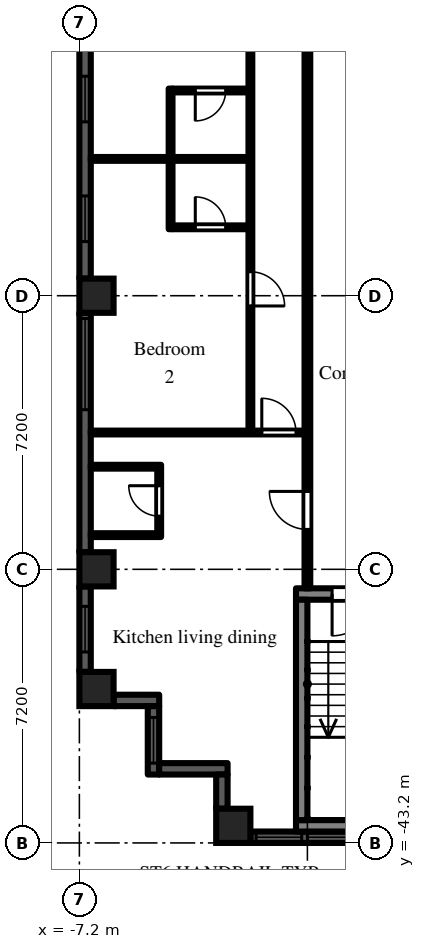
"""IFC4 building model, lengths in metres.
Left out: names, types, materials, properties, quantities, classifications, styles, units other than length and angle.
Written with IfcOpenShell. Run it as: python <this file> out.ifc"""

import sys

from ifc_helpers import new_model, si_unit, direction, frame, frame_2d, origin, origin_2d, place, context, subcontext, project, spatial, rectangle, extrude, element, fill, save


model = new_model("IFC4")
c1 = context("Model", 3, precision=1e-05, world=origin(), true_north=direction((0.0, 1.0)))
c2 = subcontext(c1, "Body", "Model", "MODEL_VIEW")
j1 = project(units=[si_unit("LENGTHUNIT", "METRE"), si_unit("PLANEANGLEUNIT", "RADIAN")], contexts=[c1])
p1 = place(None, origin())
s1 = spatial("IfcSite", under=j1, at=p1, CompositionType="ELEMENT")
p2 = place(p1, origin())
s2 = spatial("IfcBuilding", under=s1, at=p2, CompositionType="ELEMENT")
p3 = place(p2, frame((0.0, 0.0, 75.9)))
s3 = spatial("IfcBuildingStorey", under=s2, at=p3, CompositionType="ELEMENT", Elevation=75.9)
for number, where, z_axis, x_axis in (
    (1, (-6.75, -39.15, 0.0), (0.0, 0.0, 1.0), (1.0, 0.0, 0.0)),
    (2, (-6.75, -36.0, 0.0), (0.0, 0.0, 1.0), (1.0, 0.0, 0.0)),
    (3, (-6.75, -28.8, 0.0), (0.0, 0.0, 1.0), (1.0, 0.0, 0.0)),
    (4, (-3.15, -42.75, 0.0), (0.0, 0.0, 1.0), (1.0, 0.0, 0.0)),
):
    element("IfcColumn", number, at=place(p3, frame(where, z_axis=z_axis, x_axis=x_axis)), inside=s3, PredefinedType="COLUMN", context=c2, shape_type="SweptSolid", body=[
        extrude(rectangle(XDim=0.9, YDim=0.9, at=origin_2d()), origin(), (0.0, 0.0, 1.0), 3.0),
    ])
p4 = place(p3, frame((-7.05, -22.05, 0.0), z_axis=(0.0, 0.0, 1.0), x_axis=(0.0, -1.0, 0.0)))
e5 = element("IfcWall", 5, at=p4, inside=s3, PredefinedType="SOLIDWALL", context=c2, shape_type="SweptSolid", body=[
    extrude(rectangle(XDim=6.3, YDim=0.3, at=frame_2d((3.15, 0.0))), origin(), (0.0, 0.0, 1.0), 2.1),
])
p5 = place(p4, frame((0.975, 0.0, 0.2)))
e6 = element("IfcOpeningElement", 6, at=p5, cuts=e5, PredefinedType="OPENING", context=c2, shape_type="SweptSolid", body=[
    extrude(rectangle(XDim=1.2, YDim=1.85, at=frame_2d((0.6, 0.925))), frame((0.0, 0.16, 0.0), z_axis=(0.0, -1.0, 0.0), x_axis=(1.0, 0.0, 0.0)), (0.0, 0.0, 1.0), 0.32),
])
p6 = place(p4, frame((4.125, 0.0, 0.2)))
e7 = element("IfcOpeningElement", 7, at=p6, cuts=e5, PredefinedType="OPENING", context=c2, shape_type="SweptSolid", body=[
    extrude(rectangle(XDim=1.2, YDim=1.85, at=frame_2d((0.6, 0.925))), frame((0.0, 0.16, 0.0), z_axis=(0.0, -1.0, 0.0), x_axis=(1.0, 0.0, 0.0)), (0.0, 0.0, 1.0), 0.32),
])
p7 = place(p3, frame((-7.05, -29.25, 0.0), z_axis=(0.0, 0.0, 1.0), x_axis=(0.0, -1.0, 0.0)))
e8 = element("IfcWall", 8, at=p7, inside=s3, PredefinedType="SOLIDWALL", context=c2, shape_type="SweptSolid", body=[
    extrude(rectangle(XDim=6.3, YDim=0.3, at=frame_2d((3.15, 0.0))), origin(), (0.0, 0.0, 1.0), 2.1),
])
p8 = place(p7, frame((0.15, 0.0, 0.2)))
e9 = element("IfcOpeningElement", 9, at=p8, cuts=e8, PredefinedType="OPENING", context=c2, shape_type="SweptSolid", body=[
    extrude(rectangle(XDim=2.4, YDim=1.85, at=frame_2d((1.2, 0.925))), frame((0.0, 0.16, 0.0), z_axis=(0.0, -1.0, 0.0), x_axis=(1.0, 0.0, 0.0)), (0.0, 0.0, 1.0), 0.32),
])
p9 = place(p3, frame((-7.05, -36.45, 0.0), z_axis=(0.0, 0.0, 1.0), x_axis=(0.0, -1.0, 0.0)))
e10 = element("IfcWall", 10, at=p9, inside=s3, PredefinedType="SOLIDWALL", context=c2, shape_type="SweptSolid", body=[
    extrude(rectangle(XDim=2.25, YDim=0.3, at=frame_2d((1.125, 0.0))), origin(), (0.0, 0.0, 1.0), 2.1),
])
p10 = place(p9, frame((0.525, 0.0, 0.2)))
e11 = element("IfcOpeningElement", 11, at=p10, cuts=e10, PredefinedType="OPENING", context=c2, shape_type="SweptSolid", body=[
    extrude(rectangle(XDim=1.2, YDim=1.85, at=frame_2d((0.6, 0.925))), frame((0.0, 0.16, 0.0), z_axis=(0.0, -1.0, 0.0), x_axis=(1.0, 0.0, 0.0)), (0.0, 0.0, 1.0), 0.32),
])
p11 = place(p3, frame((-6.3, -39.45, 0.0), z_axis=(0.0, 0.0, 1.0), x_axis=(1.0, 0.0, 0.0)))
e12 = element("IfcWall", 12, at=p11, inside=s3, PredefinedType="SOLIDWALL", context=c2, shape_type="SweptSolid", body=[
    extrude(rectangle(XDim=1.2, YDim=0.3, at=frame_2d((0.6, 0.0))), origin(), (0.0, 0.0, 1.0), 2.575),
])
p12 = place(p3, frame((-5.25, -39.6, 0.0), z_axis=(0.0, 0.0, 1.0), x_axis=(0.0, -1.0, 0.0)))
e13 = element("IfcWall", 13, at=p12, inside=s3, PredefinedType="SOLIDWALL", context=c2, shape_type="SweptSolid", body=[
    extrude(rectangle(XDim=1.8, YDim=0.3, at=frame_2d((0.9, 0.0))), origin(), (0.0, 0.0, 1.0), 2.575),
])
p13 = place(p12, frame((0.3, 0.0, 0.2)))
e14 = element("IfcOpeningElement", 14, at=p13, cuts=e13, PredefinedType="OPENING", context=c2, shape_type="SweptSolid", body=[
    extrude(rectangle(XDim=1.2, YDim=1.85, at=frame_2d((0.6, 0.925))), frame((0.0, 0.16, 0.0), z_axis=(0.0, -1.0, 0.0), x_axis=(1.0, 0.0, 0.0)), (0.0, 0.0, 1.0), 0.32),
])
p14 = place(p3, frame((-5.1, -41.25, 0.0), z_axis=(0.0, 0.0, 1.0), x_axis=(1.0, 0.0, 0.0)))
e15 = element("IfcWall", 15, at=p14, inside=s3, PredefinedType="SOLIDWALL", context=c2, shape_type="SweptSolid", body=[
    extrude(rectangle(XDim=1.8, YDim=0.3, at=frame_2d((0.9, 0.0))), origin(), (0.0, 0.0, 1.0), 2.575),
])
p15 = place(p3, frame((-3.45, -41.4, 0.0), z_axis=(0.0, 0.0, 1.0), x_axis=(0.0, -1.0, 0.0)))
e16 = element("IfcWall", 16, at=p15, inside=s3, PredefinedType="SOLIDWALL", context=c2, shape_type="SweptSolid", body=[
    extrude(rectangle(XDim=0.9, YDim=0.3, at=frame_2d((0.45, 0.0))), origin(), (0.0, 0.0, 1.0), 2.575),
])
p16 = place(p3, frame((-2.7, -43.05, 0.0), z_axis=(0.0, 0.0, 1.0), x_axis=(1.0, 0.0, 0.0)))
e17 = element("IfcWall", 17, at=p16, inside=s3, PredefinedType="SOLIDWALL", context=c2, shape_type="SweptSolid", body=[
    extrude(rectangle(XDim=5.4, YDim=0.3, at=frame_2d((2.7, 0.0))), origin(), (0.0, 0.0, 1.0), 2.1),
])
p17 = place(p16, frame((1.5, 0.0, 0.2)))
e18 = element("IfcOpeningElement", 18, at=p17, cuts=e17, PredefinedType="OPENING", context=c2, shape_type="SweptSolid", body=[
    extrude(rectangle(XDim=2.4, YDim=1.85, at=frame_2d((1.2, 0.925))), frame((0.0, 0.16, 0.0), z_axis=(0.0, -1.0, 0.0), x_axis=(1.0, 0.0, 0.0)), (0.0, 0.0, 1.0), 0.32),
])
p18 = place(p16, frame((0.15, 0.0, 0.2)))
e19 = element("IfcOpeningElement", 19, at=p18, cuts=e17, PredefinedType="OPENING", context=c2, shape_type="SweptSolid", body=[
    extrude(rectangle(XDim=1.2, YDim=1.85, at=frame_2d((0.6, 0.925))), frame((0.0, 0.16, 0.0), z_axis=(0.0, -1.0, 0.0), x_axis=(1.0, 0.0, 0.0)), (0.0, 0.0, 1.0), 0.32),
])
p19 = place(p16, frame((4.05, 0.0, 0.2)))
e20 = element("IfcOpeningElement", 20, at=p19, cuts=e17, PredefinedType="OPENING", context=c2, shape_type="SweptSolid", body=[
    extrude(rectangle(XDim=1.2, YDim=1.85, at=frame_2d((0.6, 0.925))), frame((0.0, 0.16, 0.0), z_axis=(0.0, -1.0, 0.0), x_axis=(1.0, 0.0, 0.0)), (0.0, 0.0, 1.0), 0.32),
])
p20 = place(p3, frame((-1.5, -36.65, 0.0), z_axis=(0.0, 0.0, 1.0), x_axis=(1.0, 0.0, 0.0)))
e21 = element("IfcWall", 21, at=p20, inside=s3, PredefinedType="SHEAR", context=c2, shape_type="SweptSolid", body=[
    extrude(rectangle(XDim=3.0, YDim=0.3, at=frame_2d((1.5, 0.0))), origin(), (0.0, 0.0, 1.0), 2.575),
])
p21 = place(p20, frame((0.95, 0.0, 0.0)))
e22 = element("IfcOpeningElement", 22, at=p21, cuts=e21, PredefinedType="OPENING", context=c2, shape_type="SweptSolid", body=[
    extrude(rectangle(XDim=1.1, YDim=2.1, at=frame_2d((0.55, 1.05))), frame((0.0, 0.16, 0.0), z_axis=(0.0, -1.0, 0.0), x_axis=(1.0, 0.0, 0.0)), (0.0, 0.0, 1.0), 0.32),
])
p22 = place(p3, frame((-1.5, -42.75, 0.0), z_axis=(0.0, 0.0, 1.0), x_axis=(1.0, 0.0, 0.0)))
e23 = element("IfcWall", 23, at=p22, inside=s3, PredefinedType="SHEAR", context=c2, shape_type="SweptSolid", body=[
    extrude(rectangle(XDim=3.0, YDim=0.3, at=frame_2d((1.5, 0.0))), origin(), (0.0, 0.0, 1.0), 2.575),
])
p23 = place(p3, frame((-1.35, -36.8, 0.0), z_axis=(0.0, 0.0, 1.0), x_axis=(0.0, -1.0, 0.0)))
e24 = element("IfcWall", 24, at=p23, inside=s3, PredefinedType="SHEAR", context=c2, shape_type="SweptSolid", body=[
    extrude(rectangle(XDim=5.8, YDim=0.3, at=frame_2d((2.9, 0.0))), origin(), (0.0, 0.0, 1.0), 2.575),
])
for number, where, z_axis, x_axis in (
    (25, (-6.9, -35.1, 0.0), (0.0, 0.0, 1.0), (1.0, 0.0, 0.0)),
    (26, (-6.9, -33.3, 0.0), (0.0, 0.0, 1.0), (1.0, 0.0, 0.0)),
):
    element("IfcWall", number, at=place(p3, frame(where, z_axis=z_axis, x_axis=x_axis)), inside=s3, PredefinedType="PARTITIONING", context=c2, shape_type="SweptSolid", body=[
        extrude(rectangle(XDim=1.85, YDim=0.1, at=frame_2d((0.925, 0.0))), origin(), (0.0, 0.0, 1.0), 2.575),
    ])
p24 = place(p3, frame((-6.9, -32.4, 0.0), z_axis=(0.0, 0.0, 1.0), x_axis=(1.0, 0.0, 0.0)))
e27 = element("IfcWall", 27, at=p24, inside=s3, PredefinedType="PARTITIONING", context=c2, shape_type="SweptSolid", body=[
    extrude(rectangle(XDim=5.625, YDim=0.1, at=frame_2d((2.812, 0.0))), origin(), (0.0, 0.0, 1.0), 2.575),
])
p25 = place(p24, frame((4.5, 0.0, 0.0)))
e28 = element("IfcOpeningElement", 28, at=p25, cuts=e27, PredefinedType="OPENING", context=c2, shape_type="SweptSolid", body=[
    extrude(rectangle(XDim=0.9, YDim=2.1, at=frame_2d((0.45, 1.05))), frame((0.0, 0.06, 0.0), z_axis=(0.0, -1.0, 0.0), x_axis=(1.0, 0.0, 0.0)), (0.0, 0.0, 1.0), 0.12),
])
p26 = place(p3, frame((-6.9, -25.2, 0.0), z_axis=(0.0, 0.0, 1.0), x_axis=(1.0, 0.0, 0.0)))
e29 = element("IfcWall", 29, at=p26, inside=s3, PredefinedType="PARTITIONING", context=c2, shape_type="SweptSolid", body=[
    extrude(rectangle(XDim=4.15, YDim=0.1, at=frame_2d((2.075, 0.0))), origin(), (0.0, 0.0, 1.0), 2.575),
])
p27 = place(p3, frame((-5.1, -35.05, 0.0), z_axis=(0.0, 0.0, 1.0), x_axis=(0.0, 1.0, 0.0)))
e30 = element("IfcWall", 30, at=p27, inside=s3, PredefinedType="PARTITIONING", context=c2, shape_type="SweptSolid", body=[
    extrude(rectangle(XDim=1.7, YDim=0.1, at=frame_2d((0.85, 0.0))), origin(), (0.0, 0.0, 1.0), 2.575),
])
p28 = place(p27, frame((0.45, 0.0, 0.0)))
e31 = element("IfcOpeningElement", 31, at=p28, cuts=e30, PredefinedType="OPENING", context=c2, shape_type="SweptSolid", body=[
    extrude(rectangle(XDim=0.8, YDim=2.1, at=frame_2d((0.4, 1.05))), frame((0.0, 0.06, 0.0), z_axis=(0.0, -1.0, 0.0), x_axis=(1.0, 0.0, 0.0)), (0.0, 0.0, 1.0), 0.12),
])
p29 = place(p3, frame((-4.8, -27.05, 0.0), z_axis=(0.0, 0.0, 1.0), x_axis=(0.0, 1.0, 0.0)))
e32 = element("IfcWall", 32, at=p29, inside=s3, PredefinedType="PARTITIONING", context=c2, shape_type="SweptSolid", body=[
    extrude(rectangle(XDim=3.7, YDim=0.1, at=frame_2d((1.85, 0.0))), origin(), (0.0, 0.0, 1.0), 2.575),
])
p30 = place(p3, frame((-4.75, -27.0, 0.0), z_axis=(0.0, 0.0, 1.0), x_axis=(1.0, 0.0, 0.0)))
e33 = element("IfcWall", 33, at=p30, inside=s3, PredefinedType="PARTITIONING", context=c2, shape_type="SweptSolid", body=[
    extrude(rectangle(XDim=2.0, YDim=0.1, at=frame_2d((1.0, 0.0))), origin(), (0.0, 0.0, 1.0), 2.575),
])
p31 = place(p30, frame((0.6, 0.0, 0.0)))
e34 = element("IfcOpeningElement", 34, at=p31, cuts=e33, PredefinedType="OPENING", context=c2, shape_type="SweptSolid", body=[
    extrude(rectangle(XDim=0.8, YDim=2.1, at=frame_2d((0.4, 1.05))), frame((0.0, 0.06, 0.0), z_axis=(0.0, -1.0, 0.0), x_axis=(1.0, 0.0, 0.0)), (0.0, 0.0, 1.0), 0.12),
])
p32 = place(p3, frame((-4.75, -23.4, 0.0), z_axis=(0.0, 0.0, 1.0), x_axis=(1.0, 0.0, 0.0)))
e35 = element("IfcWall", 35, at=p32, inside=s3, PredefinedType="PARTITIONING", context=c2, shape_type="SweptSolid", body=[
    extrude(rectangle(XDim=2.0, YDim=0.1, at=frame_2d((1.0, 0.0))), origin(), (0.0, 0.0, 1.0), 2.575),
])
p33 = place(p32, frame((0.6, 0.0, 0.0)))
e36 = element("IfcOpeningElement", 36, at=p33, cuts=e35, PredefinedType="OPENING", context=c2, shape_type="SweptSolid", body=[
    extrude(rectangle(XDim=0.8, YDim=2.1, at=frame_2d((0.4, 1.05))), frame((0.0, 0.06, 0.0), z_axis=(0.0, -1.0, 0.0), x_axis=(1.0, 0.0, 0.0)), (0.0, 0.0, 1.0), 0.12),
])
p34 = place(p3, frame((-2.7, -32.35, 0.0), z_axis=(0.0, 0.0, 1.0), x_axis=(0.0, 1.0, 0.0)))
e37 = element("IfcWall", 37, at=p34, inside=s3, PredefinedType="PARTITIONING", context=c2, shape_type="SweptSolid", body=[
    extrude(rectangle(XDim=14.275, YDim=0.1, at=frame_2d((7.138, 0.0))), origin(), (0.0, 0.0, 1.0), 2.575),
])
p35 = place(p34, frame((3.28, 0.0, 0.0)))
e38 = element("IfcOpeningElement", 38, at=p35, cuts=e37, PredefinedType="OPENING", context=c2, shape_type="SweptSolid", body=[
    extrude(rectangle(XDim=0.9, YDim=2.1, at=frame_2d((0.45, 1.05))), frame((0.0, 0.06, 0.0), z_axis=(0.0, -1.0, 0.0), x_axis=(1.0, 0.0, 0.0)), (0.0, 0.0, 1.0), 0.12),
])
p36 = place(p34, frame((10.12, 0.0, 0.0)))
e39 = element("IfcOpeningElement", 39, at=p36, cuts=e37, PredefinedType="OPENING", context=c2, shape_type="SweptSolid", body=[
    extrude(rectangle(XDim=0.9, YDim=2.1, at=frame_2d((0.45, 1.05))), frame((0.0, 0.06, 0.0), z_axis=(0.0, -1.0, 0.0), x_axis=(1.0, 0.0, 0.0)), (0.0, 0.0, 1.0), 0.12),
])
p37 = place(p3, frame((-1.2, -36.5, 0.0), z_axis=(0.0, 0.0, 1.0), x_axis=(0.0, 1.0, 0.0)))
e40 = element("IfcWall", 40, at=p37, inside=s3, PredefinedType="PARTITIONING", context=c2, shape_type="SweptSolid", body=[
    extrude(rectangle(XDim=35.225, YDim=0.15, at=frame_2d((17.613, 0.0))), origin(), (0.0, 0.0, 1.0), 2.575),
])
p38 = place(p37, frame((23.05, 0.0, 0.0)))
e41 = element("IfcOpeningElement", 41, at=p38, cuts=e40, PredefinedType="OPENING", context=c2, shape_type="SweptSolid", body=[
    extrude(rectangle(XDim=0.9, YDim=2.1, at=frame_2d((0.45, 1.05))), frame((0.0, 0.085, 0.0), z_axis=(0.0, -1.0, 0.0), x_axis=(1.0, 0.0, 0.0)), (0.0, 0.0, 1.0), 0.17),
])
p39 = place(p37, frame((26.65, 0.0, 0.0)))
e42 = element("IfcOpeningElement", 42, at=p39, cuts=e40, PredefinedType="OPENING", context=c2, shape_type="SweptSolid", body=[
    extrude(rectangle(XDim=0.9, YDim=2.1, at=frame_2d((0.45, 1.05))), frame((0.0, 0.085, 0.0), z_axis=(0.0, -1.0, 0.0), x_axis=(1.0, 0.0, 0.0)), (0.0, 0.0, 1.0), 0.17),
])
p40 = place(p37, frame((20.75, 0.0, 0.0)))
e43 = element("IfcOpeningElement", 43, at=p40, cuts=e40, PredefinedType="OPENING", context=c2, shape_type="SweptSolid", body=[
    extrude(rectangle(XDim=0.9, YDim=2.1, at=frame_2d((0.45, 1.05))), frame((0.0, 0.085, 0.0), z_axis=(0.0, -1.0, 0.0), x_axis=(1.0, 0.0, 0.0)), (0.0, 0.0, 1.0), 0.17),
])
p41 = place(p37, frame((18.95, 0.0, 0.0)))
e44 = element("IfcOpeningElement", 44, at=p41, cuts=e40, PredefinedType="OPENING", context=c2, shape_type="SweptSolid", body=[
    extrude(rectangle(XDim=0.9, YDim=2.1, at=frame_2d((0.45, 1.05))), frame((0.0, 0.085, 0.0), z_axis=(0.0, -1.0, 0.0), x_axis=(1.0, 0.0, 0.0)), (0.0, 0.0, 1.0), 0.17),
])
p42 = place(p37, frame((1.55, 0.0, 0.0)))
e45 = element("IfcOpeningElement", 45, at=p42, cuts=e40, PredefinedType="OPENING", context=c2, shape_type="SweptSolid", body=[
    extrude(rectangle(XDim=1.0, YDim=2.1, at=frame_2d((0.5, 1.05))), frame((0.0, 0.085, 0.0), z_axis=(0.0, -1.0, 0.0), x_axis=(1.0, 0.0, 0.0)), (0.0, 0.0, 1.0), 0.17),
])
p43 = place(p5, origin())
e46 = element("IfcWindow", 46, at=p43, inside=s3, PartitioningType="SINGLE_PANEL", PredefinedType="WINDOW", context=c2, shape_type="SweptSolid", body=[
    extrude(rectangle(XDim=1.2, YDim=1.85, at=frame_2d((0.6, 0.925))), frame((0.0, 0.03, 0.0), z_axis=(0.0, -1.0, 0.0), x_axis=(1.0, 0.0, 0.0)), (0.0, 0.0, 1.0), 0.06),
])
fill(e6, e46)
p44 = place(p6, origin())
e47 = element("IfcWindow", 47, at=p44, inside=s3, PartitioningType="SINGLE_PANEL", PredefinedType="WINDOW", context=c2, shape_type="SweptSolid", body=[
    extrude(rectangle(XDim=1.2, YDim=1.85, at=frame_2d((0.6, 0.925))), frame((0.0, 0.03, 0.0), z_axis=(0.0, -1.0, 0.0), x_axis=(1.0, 0.0, 0.0)), (0.0, 0.0, 1.0), 0.06),
])
fill(e7, e47)
p45 = place(p8, origin())
e48 = element("IfcWindow", 48, at=p45, inside=s3, PartitioningType="SINGLE_PANEL", PredefinedType="WINDOW", context=c2, shape_type="SweptSolid", body=[
    extrude(rectangle(XDim=2.4, YDim=1.85, at=frame_2d((1.2, 0.925))), frame((0.0, 0.03, 0.0), z_axis=(0.0, -1.0, 0.0), x_axis=(1.0, 0.0, 0.0)), (0.0, 0.0, 1.0), 0.06),
])
fill(e9, e48)
p46 = place(p10, origin())
e49 = element("IfcWindow", 49, at=p46, inside=s3, PartitioningType="SINGLE_PANEL", PredefinedType="WINDOW", context=c2, shape_type="SweptSolid", body=[
    extrude(rectangle(XDim=1.2, YDim=1.85, at=frame_2d((0.6, 0.925))), frame((0.0, 0.03, 0.0), z_axis=(0.0, -1.0, 0.0), x_axis=(1.0, 0.0, 0.0)), (0.0, 0.0, 1.0), 0.06),
])
fill(e11, e49)
p47 = place(p13, origin())
e50 = element("IfcWindow", 50, at=p47, inside=s3, PartitioningType="SINGLE_PANEL", PredefinedType="WINDOW", context=c2, shape_type="SweptSolid", body=[
    extrude(rectangle(XDim=1.2, YDim=1.85, at=frame_2d((0.6, 0.925))), frame((0.0, 0.03, 0.0), z_axis=(0.0, -1.0, 0.0), x_axis=(1.0, 0.0, 0.0)), (0.0, 0.0, 1.0), 0.06),
])
fill(e14, e50)
p48 = place(p17, origin())
e51 = element("IfcWindow", 51, at=p48, inside=s3, PartitioningType="SINGLE_PANEL", PredefinedType="WINDOW", context=c2, shape_type="SweptSolid", body=[
    extrude(rectangle(XDim=2.4, YDim=1.85, at=frame_2d((1.2, 0.925))), frame((0.0, 0.03, 0.0), z_axis=(0.0, -1.0, 0.0), x_axis=(1.0, 0.0, 0.0)), (0.0, 0.0, 1.0), 0.06),
])
fill(e18, e51)
p49 = place(p18, origin())
e52 = element("IfcWindow", 52, at=p49, inside=s3, PartitioningType="SINGLE_PANEL", PredefinedType="WINDOW", context=c2, shape_type="SweptSolid", body=[
    extrude(rectangle(XDim=1.2, YDim=1.85, at=frame_2d((0.6, 0.925))), frame((0.0, 0.03, 0.0), z_axis=(0.0, -1.0, 0.0), x_axis=(1.0, 0.0, 0.0)), (0.0, 0.0, 1.0), 0.06),
])
fill(e19, e52)
p50 = place(p21, frame((1.1, 0.0, 0.0), z_axis=(0.0, 0.0, 1.0), x_axis=(-1.0, 0.0, 0.0)))
e53 = element("IfcDoor", 53, at=p50, inside=s3, OperationType="SINGLE_SWING_RIGHT", PredefinedType="DOOR", context=c2, shape_type="SweptSolid", body=[
    extrude(rectangle(XDim=1.1, YDim=2.1, at=frame_2d((0.55, 1.05))), frame((0.0, 0.025, 0.0), z_axis=(0.0, -1.0, 0.0), x_axis=(1.0, 0.0, 0.0)), (0.0, 0.0, 1.0), 0.05),
])
fill(e22, e53)
p51 = place(p28, origin())
e54 = element("IfcDoor", 54, at=p51, inside=s3, OperationType="SINGLE_SWING_RIGHT", PredefinedType="DOOR", context=c2, shape_type="SweptSolid", body=[
    extrude(rectangle(XDim=0.8, YDim=2.1, at=frame_2d((0.4, 1.05))), frame((0.0, 0.025, 0.0), z_axis=(0.0, -1.0, 0.0), x_axis=(1.0, 0.0, 0.0)), (0.0, 0.0, 1.0), 0.05),
])
fill(e31, e54)
p52 = place(p42, origin())
e55 = element("IfcDoor", 55, at=p52, inside=s3, OperationType="SINGLE_SWING_RIGHT", PredefinedType="DOOR", context=c2, shape_type="SweptSolid", body=[
    extrude(rectangle(XDim=1.0, YDim=2.1, at=frame_2d((0.5, 1.05))), frame((0.0, 0.025, 0.0), z_axis=(0.0, -1.0, 0.0), x_axis=(1.0, 0.0, 0.0)), (0.0, 0.0, 1.0), 0.05),
])
fill(e45, e55)
p53 = place(p35, frame((0.9, 0.0, 0.0), z_axis=(0.0, 0.0, 1.0), x_axis=(-1.0, 0.0, 0.0)))
e56 = element("IfcDoor", 56, at=p53, inside=s3, OperationType="SINGLE_SWING_RIGHT", PredefinedType="DOOR", context=c2, shape_type="SweptSolid", body=[
    extrude(rectangle(XDim=0.9, YDim=2.1, at=frame_2d((0.45, 1.05))), frame((0.0, 0.025, 0.0), z_axis=(0.0, -1.0, 0.0), x_axis=(1.0, 0.0, 0.0)), (0.0, 0.0, 1.0), 0.05),
])
fill(e38, e56)
p54 = place(p25, origin())
e57 = element("IfcDoor", 57, at=p54, inside=s3, OperationType="SINGLE_SWING_LEFT", PredefinedType="DOOR", context=c2, shape_type="SweptSolid", body=[
    extrude(rectangle(XDim=0.9, YDim=2.1, at=frame_2d((0.45, 1.05))), frame((0.0, 0.025, 0.0), z_axis=(0.0, -1.0, 0.0), x_axis=(1.0, 0.0, 0.0)), (0.0, 0.0, 1.0), 0.05),
])
fill(e28, e57)
p55 = place(p33, frame((0.8, 0.0, 0.0), z_axis=(0.0, 0.0, 1.0), x_axis=(-1.0, 0.0, 0.0)))
e58 = element("IfcDoor", 58, at=p55, inside=s3, OperationType="SINGLE_SWING_RIGHT", PredefinedType="DOOR", context=c2, shape_type="SweptSolid", body=[
    extrude(rectangle(XDim=0.8, YDim=2.1, at=frame_2d((0.4, 1.05))), frame((0.0, 0.025, 0.0), z_axis=(0.0, -1.0, 0.0), x_axis=(1.0, 0.0, 0.0)), (0.0, 0.0, 1.0), 0.05),
])
fill(e36, e58)
p56 = place(p31, origin())
e59 = element("IfcDoor", 59, at=p56, inside=s3, OperationType="SINGLE_SWING_LEFT", PredefinedType="DOOR", context=c2, shape_type="SweptSolid", body=[
    extrude(rectangle(XDim=0.8, YDim=2.1, at=frame_2d((0.4, 1.05))), frame((0.0, 0.025, 0.0), z_axis=(0.0, -1.0, 0.0), x_axis=(1.0, 0.0, 0.0)), (0.0, 0.0, 1.0), 0.05),
])
fill(e34, e59)
save(model, sys.argv[1])
